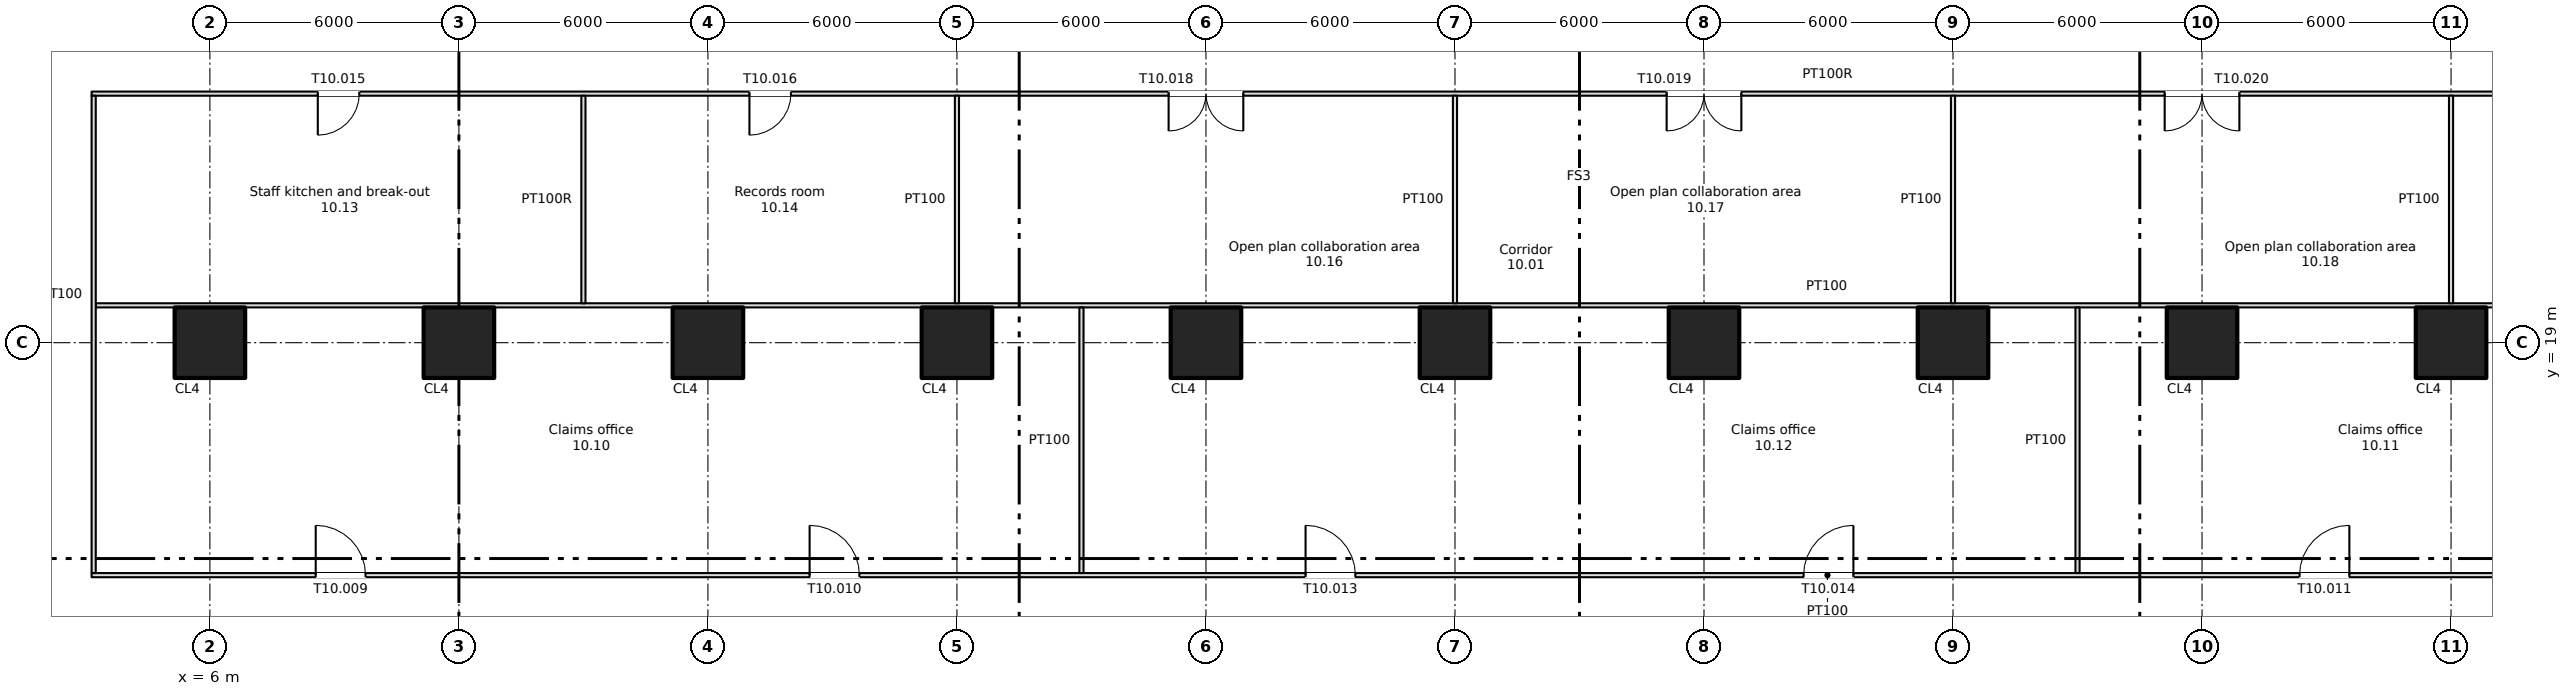
"""IFC4 building model, lengths in metres.
Left out: names, types, materials, properties, quantities, classifications, styles, units other than length and angle.
Written with IfcOpenShell. Run it as: python <this file> out.ifc"""

import sys

from ifc_helpers import new_model, si_unit, direction, frame, frame_2d, origin, origin_2d, place, context, subcontext, project, spatial, rectangle, extrude, element, fill, save


model = new_model("IFC4")
c1 = context("Model", 3, precision=1e-05, world=origin(), true_north=direction((0.0, 1.0)))
c2 = subcontext(c1, "Body", "Model", "MODEL_VIEW")
j1 = project(units=[si_unit("LENGTHUNIT", "METRE"), si_unit("PLANEANGLEUNIT", "RADIAN")], contexts=[c1])
p1 = place(None, origin())
s1 = spatial("IfcSite", under=j1, at=p1, CompositionType="ELEMENT")
p2 = place(p1, origin())
s2 = spatial("IfcBuilding", under=s1, at=p2, CompositionType="ELEMENT")
p3 = place(p2, frame((0.0, 0.0, 45.0)))
s3 = spatial("IfcBuildingStorey", under=s2, at=p3, CompositionType="ELEMENT", Elevation=45.0)
for number, where, z_axis, x_axis in (
    (1, (6.0, 19.0, 0.0), (0.0, 0.0, 1.0), (1.0, 0.0, 0.0)),
    (2, (12.0, 19.0, 0.0), (0.0, 0.0, 1.0), (1.0, 0.0, 0.0)),
    (3, (18.0, 19.0, 0.0), (0.0, 0.0, 1.0), (1.0, 0.0, 0.0)),
    (4, (24.0, 19.0, 0.0), (0.0, 0.0, 1.0), (1.0, 0.0, 0.0)),
    (5, (30.0, 19.0, 0.0), (0.0, 0.0, 1.0), (1.0, 0.0, 0.0)),
    (6, (36.0, 19.0, 0.0), (0.0, 0.0, 1.0), (1.0, 0.0, 0.0)),
    (7, (42.0, 19.0, 0.0), (0.0, 0.0, 1.0), (1.0, 0.0, 0.0)),
    (8, (48.0, 19.0, 0.0), (0.0, 0.0, 1.0), (1.0, 0.0, 0.0)),
    (9, (54.0, 19.0, 0.0), (0.0, 0.0, 1.0), (1.0, 0.0, 0.0)),
    (10, (60.0, 19.0, 0.0), (0.0, 0.0, 1.0), (1.0, 0.0, 0.0)),
):
    element("IfcColumn", number, at=place(p3, frame(where, z_axis=z_axis, x_axis=x_axis)), inside=s3, PredefinedType="COLUMN", context=c2, shape_type="SweptSolid", body=[
        extrude(rectangle(XDim=1.7, YDim=1.7, at=origin_2d()), origin(), (0.0, 0.0, 1.0), 3.35),
    ])
p4 = place(p3, frame((3.15, 13.4, 0.0), z_axis=(0.0, 0.0, 1.0), x_axis=(1.0, 0.0, 0.0)))
e11 = element("IfcWall", 11, at=p4, inside=s3, PredefinedType="PARTITIONING", context=c2, shape_type="SweptSolid", body=[
    extrude(rectangle(XDim=71.7, YDim=0.1, at=frame_2d((35.85, 0.0))), origin(), (0.0, 0.0, 1.0), 3.35),
])
p5 = place(p4, frame((5.4, 0.0, 0.0)))
e12 = element("IfcOpeningElement", 12, at=p5, cuts=e11, PredefinedType="OPENING", context=c2, shape_type="SweptSolid", body=[
    extrude(rectangle(XDim=1.2, YDim=2.1, at=frame_2d((0.6, 1.05))), frame((0.0, 0.06, 0.0), z_axis=(0.0, -1.0, 0.0), x_axis=(1.0, 0.0, 0.0)), (0.0, 0.0, 1.0), 0.12),
])
p6 = place(p4, frame((17.3, 0.0, 0.0)))
e13 = element("IfcOpeningElement", 13, at=p6, cuts=e11, PredefinedType="OPENING", context=c2, shape_type="SweptSolid", body=[
    extrude(rectangle(XDim=1.2, YDim=2.1, at=frame_2d((0.6, 1.05))), frame((0.0, 0.06, 0.0), z_axis=(0.0, -1.0, 0.0), x_axis=(1.0, 0.0, 0.0)), (0.0, 0.0, 1.0), 0.12),
])
p7 = place(p4, frame((53.2, 0.0, 0.0)))
e14 = element("IfcOpeningElement", 14, at=p7, cuts=e11, PredefinedType="OPENING", context=c2, shape_type="SweptSolid", body=[
    extrude(rectangle(XDim=1.2, YDim=2.1, at=frame_2d((0.6, 1.05))), frame((0.0, 0.06, 0.0), z_axis=(0.0, -1.0, 0.0), x_axis=(1.0, 0.0, 0.0)), (0.0, 0.0, 1.0), 0.12),
])
p8 = place(p4, frame((65.1, 0.0, 0.0)))
e15 = element("IfcOpeningElement", 15, at=p8, cuts=e11, PredefinedType="OPENING", context=c2, shape_type="SweptSolid", body=[
    extrude(rectangle(XDim=1.2, YDim=2.1, at=frame_2d((0.6, 1.05))), frame((0.0, 0.06, 0.0), z_axis=(0.0, -1.0, 0.0), x_axis=(1.0, 0.0, 0.0)), (0.0, 0.0, 1.0), 0.12),
])
p9 = place(p4, frame((29.25, 0.0, 0.0)))
e16 = element("IfcOpeningElement", 16, at=p9, cuts=e11, PredefinedType="OPENING", context=c2, shape_type="SweptSolid", body=[
    extrude(rectangle(XDim=1.2, YDim=2.1, at=frame_2d((0.6, 1.05))), frame((0.0, 0.06, 0.0), z_axis=(0.0, -1.0, 0.0), x_axis=(1.0, 0.0, 0.0)), (0.0, 0.0, 1.0), 0.12),
])
p10 = place(p4, frame((41.25, 0.0, 0.0)))
e17 = element("IfcOpeningElement", 17, at=p10, cuts=e11, PredefinedType="OPENING", context=c2, shape_type="SweptSolid", body=[
    extrude(rectangle(XDim=1.2, YDim=2.1, at=frame_2d((0.6, 1.05))), frame((0.0, 0.06, 0.0), z_axis=(0.0, -1.0, 0.0), x_axis=(1.0, 0.0, 0.0)), (0.0, 0.0, 1.0), 0.12),
])
p11 = place(p3, frame((3.25, 19.9, 0.0), z_axis=(0.0, 0.0, 1.0), x_axis=(1.0, 0.0, 0.0)))
e18 = element("IfcWall", 18, at=p11, inside=s3, PredefinedType="PARTITIONING", context=c2, shape_type="SweptSolid", body=[
    extrude(rectangle(XDim=71.5, YDim=0.1, at=frame_2d((35.75, 0.0))), origin(), (0.0, 0.0, 1.0), 3.35),
])
p12 = place(p3, frame((3.15, 25.0, 0.0), z_axis=(0.0, 0.0, 1.0), x_axis=(1.0, 0.0, 0.0)))
e19 = element("IfcWall", 19, at=p12, inside=s3, PredefinedType="PARTITIONING", context=c2, shape_type="SweptSolid", body=[
    extrude(rectangle(XDim=71.7, YDim=0.1, at=frame_2d((35.85, 0.0))), origin(), (0.0, 0.0, 1.0), 3.35),
])
p13 = place(p12, frame((5.45, 0.0, 0.0)))
e20 = element("IfcOpeningElement", 20, at=p13, cuts=e19, PredefinedType="OPENING", context=c2, shape_type="SweptSolid", body=[
    extrude(rectangle(XDim=1.0, YDim=2.1, at=frame_2d((0.5, 1.05))), frame((0.0, 0.06, 0.0), z_axis=(0.0, -1.0, 0.0), x_axis=(1.0, 0.0, 0.0)), (0.0, 0.0, 1.0), 0.12),
])
p14 = place(p12, frame((15.85, 0.0, 0.0)))
e21 = element("IfcOpeningElement", 21, at=p14, cuts=e19, PredefinedType="OPENING", context=c2, shape_type="SweptSolid", body=[
    extrude(rectangle(XDim=1.0, YDim=2.1, at=frame_2d((0.5, 1.05))), frame((0.0, 0.06, 0.0), z_axis=(0.0, -1.0, 0.0), x_axis=(1.0, 0.0, 0.0)), (0.0, 0.0, 1.0), 0.12),
])
p15 = place(p12, frame((63.35, 0.0, 0.0)))
e22 = element("IfcOpeningElement", 22, at=p15, cuts=e19, PredefinedType="OPENING", context=c2, shape_type="SweptSolid", body=[
    extrude(rectangle(XDim=1.8, YDim=2.1, at=frame_2d((0.9, 1.05))), frame((0.0, 0.06, 0.0), z_axis=(0.0, -1.0, 0.0), x_axis=(1.0, 0.0, 0.0)), (0.0, 0.0, 1.0), 0.12),
])
p16 = place(p12, frame((25.95, 0.0, 0.0)))
e23 = element("IfcOpeningElement", 23, at=p16, cuts=e19, PredefinedType="OPENING", context=c2, shape_type="SweptSolid", body=[
    extrude(rectangle(XDim=1.8, YDim=2.1, at=frame_2d((0.9, 1.05))), frame((0.0, 0.06, 0.0), z_axis=(0.0, -1.0, 0.0), x_axis=(1.0, 0.0, 0.0)), (0.0, 0.0, 1.0), 0.12),
])
p17 = place(p12, frame((37.95, 0.0, 0.0)))
e24 = element("IfcOpeningElement", 24, at=p17, cuts=e19, PredefinedType="OPENING", context=c2, shape_type="SweptSolid", body=[
    extrude(rectangle(XDim=1.8, YDim=2.1, at=frame_2d((0.9, 1.05))), frame((0.0, 0.06, 0.0), z_axis=(0.0, -1.0, 0.0), x_axis=(1.0, 0.0, 0.0)), (0.0, 0.0, 1.0), 0.12),
])
p18 = place(p12, frame((49.95, 0.0, 0.0)))
e25 = element("IfcOpeningElement", 25, at=p18, cuts=e19, PredefinedType="OPENING", context=c2, shape_type="SweptSolid", body=[
    extrude(rectangle(XDim=1.8, YDim=2.1, at=frame_2d((0.9, 1.05))), frame((0.0, 0.06, 0.0), z_axis=(0.0, -1.0, 0.0), x_axis=(1.0, 0.0, 0.0)), (0.0, 0.0, 1.0), 0.12),
])
p19 = place(p3, frame((3.2, 13.45, 0.0), z_axis=(0.0, 0.0, 1.0), x_axis=(0.0, 1.0, 0.0)))
e26 = element("IfcWall", 26, at=p19, inside=s3, PredefinedType="PARTITIONING", context=c2, shape_type="SweptSolid", body=[
    extrude(rectangle(XDim=11.5, YDim=0.1, at=frame_2d((5.75, 0.0))), origin(), (0.0, 0.0, 1.0), 3.35),
])
for number, where, z_axis, x_axis in (
    (27, (15.0, 19.95, 0.0), (0.0, 0.0, 1.0), (0.0, 1.0, 0.0)),
    (28, (24.0, 19.95, 0.0), (0.0, 0.0, 1.0), (0.0, 1.0, 0.0)),
):
    element("IfcWall", number, at=place(p3, frame(where, z_axis=z_axis, x_axis=x_axis)), inside=s3, PredefinedType="PARTITIONING", context=c2, shape_type="SweptSolid", body=[
        extrude(rectangle(XDim=5.0, YDim=0.1, at=frame_2d((2.5, 0.0))), origin(), (0.0, 0.0, 1.0), 3.35),
    ])
p20 = place(p3, frame((27.0, 13.45, 0.0), z_axis=(0.0, 0.0, 1.0), x_axis=(0.0, 1.0, 0.0)))
e29 = element("IfcWall", 29, at=p20, inside=s3, PredefinedType="PARTITIONING", context=c2, shape_type="SweptSolid", body=[
    extrude(rectangle(XDim=6.4, YDim=0.1, at=frame_2d((3.2, 0.0))), origin(), (0.0, 0.0, 1.0), 3.35),
])
for number, where, z_axis, x_axis in (
    (30, (36.0, 19.95, 0.0), (0.0, 0.0, 1.0), (0.0, 1.0, 0.0)),
    (31, (48.0, 19.95, 0.0), (0.0, 0.0, 1.0), (0.0, 1.0, 0.0)),
):
    element("IfcWall", number, at=place(p3, frame(where, z_axis=z_axis, x_axis=x_axis)), inside=s3, PredefinedType="PARTITIONING", context=c2, shape_type="SweptSolid", body=[
        extrude(rectangle(XDim=5.0, YDim=0.1, at=frame_2d((2.5, 0.0))), origin(), (0.0, 0.0, 1.0), 3.35),
    ])
p21 = place(p3, frame((51.0, 13.45, 0.0), z_axis=(0.0, 0.0, 1.0), x_axis=(0.0, 1.0, 0.0)))
e32 = element("IfcWall", 32, at=p21, inside=s3, PredefinedType="PARTITIONING", context=c2, shape_type="SweptSolid", body=[
    extrude(rectangle(XDim=6.4, YDim=0.1, at=frame_2d((3.2, 0.0))), origin(), (0.0, 0.0, 1.0), 3.35),
])
p22 = place(p3, frame((60.0, 19.95, 0.0), z_axis=(0.0, 0.0, 1.0), x_axis=(0.0, 1.0, 0.0)))
e33 = element("IfcWall", 33, at=p22, inside=s3, PredefinedType="PARTITIONING", context=c2, shape_type="SweptSolid", body=[
    extrude(rectangle(XDim=5.0, YDim=0.1, at=frame_2d((2.5, 0.0))), origin(), (0.0, 0.0, 1.0), 3.35),
])
p23 = place(p5, origin())
e34 = element("IfcDoor", 34, at=p23, inside=s3, OperationType="SINGLE_SWING_LEFT", PredefinedType="DOOR", context=c2, shape_type="SweptSolid", body=[
    extrude(rectangle(XDim=1.2, YDim=2.1, at=frame_2d((0.6, 1.05))), frame((0.0, 0.025, 0.0), z_axis=(0.0, -1.0, 0.0), x_axis=(1.0, 0.0, 0.0)), (0.0, 0.0, 1.0), 0.05),
])
fill(e12, e34)
p24 = place(p6, origin())
e35 = element("IfcDoor", 35, at=p24, inside=s3, OperationType="SINGLE_SWING_LEFT", PredefinedType="DOOR", context=c2, shape_type="SweptSolid", body=[
    extrude(rectangle(XDim=1.2, YDim=2.1, at=frame_2d((0.6, 1.05))), frame((0.0, 0.025, 0.0), z_axis=(0.0, -1.0, 0.0), x_axis=(1.0, 0.0, 0.0)), (0.0, 0.0, 1.0), 0.05),
])
fill(e13, e35)
p25 = place(p7, origin())
e36 = element("IfcDoor", 36, at=p25, inside=s3, OperationType="SINGLE_SWING_RIGHT", PredefinedType="DOOR", context=c2, shape_type="SweptSolid", body=[
    extrude(rectangle(XDim=1.2, YDim=2.1, at=frame_2d((0.6, 1.05))), frame((0.0, 0.025, 0.0), z_axis=(0.0, -1.0, 0.0), x_axis=(1.0, 0.0, 0.0)), (0.0, 0.0, 1.0), 0.05),
])
fill(e14, e36)
p26 = place(p9, origin())
e37 = element("IfcDoor", 37, at=p26, inside=s3, OperationType="SINGLE_SWING_LEFT", PredefinedType="DOOR", context=c2, shape_type="SweptSolid", body=[
    extrude(rectangle(XDim=1.2, YDim=2.1, at=frame_2d((0.6, 1.05))), frame((0.0, 0.025, 0.0), z_axis=(0.0, -1.0, 0.0), x_axis=(1.0, 0.0, 0.0)), (0.0, 0.0, 1.0), 0.05),
])
fill(e16, e37)
p27 = place(p10, origin())
e38 = element("IfcDoor", 38, at=p27, inside=s3, OperationType="SINGLE_SWING_RIGHT", PredefinedType="DOOR", context=c2, shape_type="SweptSolid", body=[
    extrude(rectangle(XDim=1.2, YDim=2.1, at=frame_2d((0.6, 1.05))), frame((0.0, 0.025, 0.0), z_axis=(0.0, -1.0, 0.0), x_axis=(1.0, 0.0, 0.0)), (0.0, 0.0, 1.0), 0.05),
])
fill(e17, e38)
p28 = place(p13, origin())
e39 = element("IfcDoor", 39, at=p28, inside=s3, OperationType="SINGLE_SWING_LEFT", PredefinedType="DOOR", context=c2, shape_type="SweptSolid", body=[
    extrude(rectangle(XDim=1.0, YDim=2.1, at=frame_2d((0.5, 1.05))), frame((0.0, 0.025, 0.0), z_axis=(0.0, -1.0, 0.0), x_axis=(1.0, 0.0, 0.0)), (0.0, 0.0, 1.0), 0.05),
])
fill(e20, e39)
p29 = place(p14, origin())
e40 = element("IfcDoor", 40, at=p29, inside=s3, OperationType="SINGLE_SWING_LEFT", PredefinedType="DOOR", context=c2, shape_type="SweptSolid", body=[
    extrude(rectangle(XDim=1.0, YDim=2.1, at=frame_2d((0.5, 1.05))), frame((0.0, 0.025, 0.0), z_axis=(0.0, -1.0, 0.0), x_axis=(1.0, 0.0, 0.0)), (0.0, 0.0, 1.0), 0.05),
])
fill(e21, e40)
p30 = place(p16, origin())
e41 = element("IfcDoor", 41, at=p30, inside=s3, OperationType="DOUBLE_DOOR_SINGLE_SWING", PredefinedType="DOOR", context=c2, shape_type="SweptSolid", body=[
    extrude(rectangle(XDim=1.8, YDim=2.1, at=frame_2d((0.9, 1.05))), frame((0.0, 0.025, 0.0), z_axis=(0.0, -1.0, 0.0), x_axis=(1.0, 0.0, 0.0)), (0.0, 0.0, 1.0), 0.05),
])
fill(e23, e41)
p31 = place(p17, origin())
e42 = element("IfcDoor", 42, at=p31, inside=s3, OperationType="DOUBLE_DOOR_SINGLE_SWING", PredefinedType="DOOR", context=c2, shape_type="SweptSolid", body=[
    extrude(rectangle(XDim=1.8, YDim=2.1, at=frame_2d((0.9, 1.05))), frame((0.0, 0.025, 0.0), z_axis=(0.0, -1.0, 0.0), x_axis=(1.0, 0.0, 0.0)), (0.0, 0.0, 1.0), 0.05),
])
fill(e24, e42)
p32 = place(p18, origin())
e43 = element("IfcDoor", 43, at=p32, inside=s3, OperationType="DOUBLE_DOOR_SINGLE_SWING", PredefinedType="DOOR", context=c2, shape_type="SweptSolid", body=[
    extrude(rectangle(XDim=1.8, YDim=2.1, at=frame_2d((0.9, 1.05))), frame((0.0, 0.025, 0.0), z_axis=(0.0, -1.0, 0.0), x_axis=(1.0, 0.0, 0.0)), (0.0, 0.0, 1.0), 0.05),
])
fill(e25, e43)
save(model, sys.argv[1])
